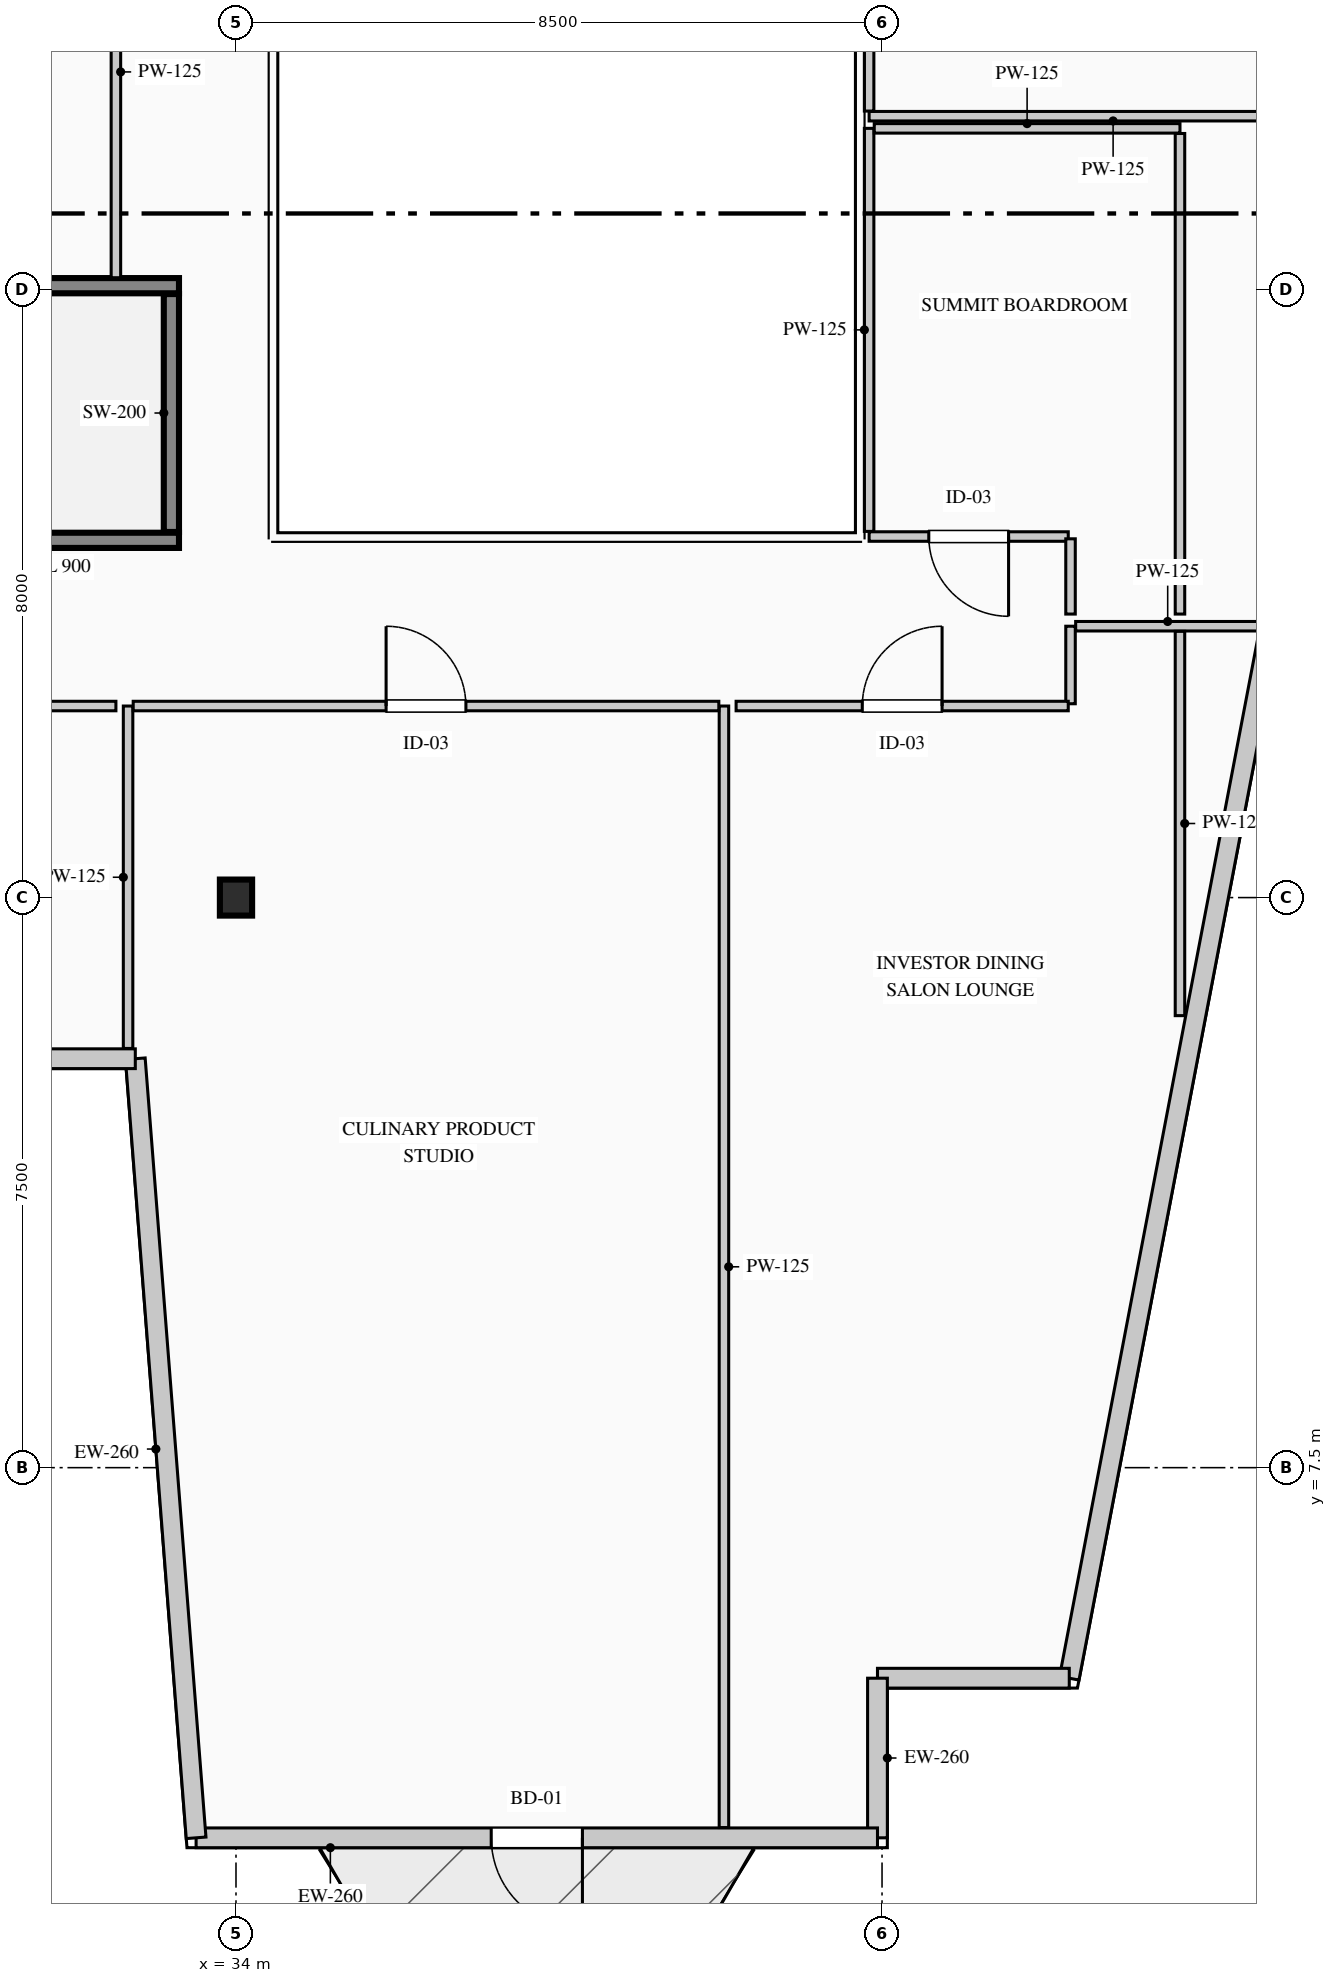
"""IFC4 building model, lengths in metres.
Left out: names, types, materials, properties, quantities, classifications, styles, units other than length and angle.
Written with IfcOpenShell. Run it as: python <this file> out.ifc"""

import sys

from ifc_helpers import new_model, si_unit, direction, frame, frame_2d, origin, origin_2d, place, context, subcontext, project, spatial, rectangle, i_section, extrude, element, fill, save


model = new_model("IFC4")
c1 = context("Model", 3, precision=1e-05, world=origin(), true_north=direction((0.0, 1.0)))
c2 = subcontext(c1, "Body", "Model", "MODEL_VIEW")
j1 = project(units=[si_unit("LENGTHUNIT", "METRE"), si_unit("PLANEANGLEUNIT", "RADIAN")], contexts=[c1])
p1 = place(None, origin())
s1 = spatial("IfcSite", under=j1, at=p1, CompositionType="ELEMENT")
p2 = place(p1, origin())
s2 = spatial("IfcBuilding", under=s1, at=p2, CompositionType="ELEMENT")
p3 = place(p2, frame((0.0, 0.0, 170.65)))
s3 = spatial("IfcBuildingStorey", under=s2, at=p3, CompositionType="ELEMENT", Elevation=170.65)
p4 = place(p3, frame((26.05, 19.7, 0.0), z_axis=(0.0, 0.0, 1.0), x_axis=(1.0, 0.0, 0.0)))
e1 = element("IfcWall", 1, at=p4, inside=s3, PredefinedType="SHEAR", context=c2, shape_type="SweptSolid", body=[
    extrude(rectangle(XDim=7.2, YDim=0.2, at=frame_2d((3.6, 0.0))), origin(), (0.0, 0.0, 1.0), 3.95),
])
p5 = place(p4, frame((0.38, 0.0, 0.0)))
e2 = element("IfcOpeningElement", 2, at=p5, cuts=e1, PredefinedType="OPENING", context=c2, shape_type="SweptSolid", body=[
    extrude(rectangle(XDim=1.15, YDim=2.2, at=frame_2d((0.575, 1.1))), frame((0.0, 0.11, 0.0), z_axis=(0.0, -1.0, 0.0), x_axis=(1.0, 0.0, 0.0)), (0.0, 0.0, 1.0), 0.22),
])
p6 = place(p3, frame((26.05, 23.05, 0.0), z_axis=(0.0, 0.0, 1.0), x_axis=(1.0, 0.0, 0.0)))
e3 = element("IfcWall", 3, at=p6, inside=s3, PredefinedType="SHEAR", context=c2, shape_type="SweptSolid", body=[
    extrude(rectangle(XDim=7.2, YDim=0.2, at=frame_2d((3.6, 0.0))), origin(), (0.0, 0.0, 1.0), 3.95),
])
p7 = place(p3, frame((33.15, 19.81, 0.0), z_axis=(0.0, 0.0, 1.0), x_axis=(0.0, 1.0, 0.0)))
e4 = element("IfcWall", 4, at=p7, inside=s3, PredefinedType="SHEAR", context=c2, shape_type="SweptSolid", body=[
    extrude(rectangle(XDim=3.13, YDim=0.2, at=frame_2d((1.565, 0.0))), origin(), (0.0, 0.0, 1.0), 3.95),
])
p8 = place(p3, frame((34.0, 15.0, 0.0), z_axis=(0.0, 0.0, 1.0), x_axis=(1.0, 0.0, 0.0)))
e5 = element("IfcColumn", 5, at=p8, inside=s3, PredefinedType="COLUMN", context=c2, shape_type="SweptSolid", body=[
    extrude(i_section(OverallWidth=0.424, OverallDepth=0.474, WebThickness=0.048, FlangeThickness=0.077, FilletRadius=0.015, at=origin_2d()), origin(), (0.0, 0.0, 1.0), 3.95),
])
p9 = place(p3, frame((51.942, 41.27, 0.0), z_axis=(0.0, 0.0, 1.0), x_axis=(-0.187592192405, -0.982247000173, 0.0)))
e6 = element("IfcWall", 6, at=p9, inside=s3, PredefinedType="STANDARD", context=c2, shape_type="SweptSolid", body=[
    extrude(rectangle(XDim=37.2, YDim=0.26, at=frame_2d((18.6, 0.0))), origin(), (0.0, 0.0, 1.0), 3.69),
])
p10 = place(p9, frame((12.342, 0.0, 0.9)))
e7 = element("IfcOpeningElement", 7, at=p10, cuts=e6, PredefinedType="OPENING", context=c2, shape_type="SweptSolid", body=[
    extrude(rectangle(XDim=2.1, YDim=2.0, at=frame_2d((1.05, 1.0))), frame((0.0, 0.14, 0.0), z_axis=(0.0, -1.0, 0.0), x_axis=(1.0, 0.0, 0.0)), (0.0, 0.0, 1.0), 0.28),
])
p11 = place(p3, frame((44.963, 4.73, 0.0), z_axis=(0.0, 0.0, 1.0), x_axis=(-1.0, 0.0, 0.0)))
e8 = element("IfcWall", 8, at=p11, inside=s3, PredefinedType="STANDARD", context=c2, shape_type="SweptSolid", body=[
    extrude(rectangle(XDim=2.523, YDim=0.26, at=frame_2d((1.262, 0.0))), origin(), (0.0, 0.0, 1.0), 3.69),
])
p12 = place(p3, frame((42.44, 4.73, 0.0), z_axis=(0.0, 0.0, 1.0), x_axis=(0.0, -1.0, 0.0)))
e9 = element("IfcWall", 9, at=p12, inside=s3, PredefinedType="STANDARD", context=c2, shape_type="SweptSolid", body=[
    extrude(rectangle(XDim=2.1, YDim=0.26, at=frame_2d((1.05, 0.0))), origin(), (0.0, 0.0, 1.0), 3.69),
])
p13 = place(p3, frame((42.44, 2.63, 0.0), z_axis=(0.0, 0.0, 1.0), x_axis=(-1.0, 0.0, 0.0)))
e10 = element("IfcWall", 10, at=p13, inside=s3, PredefinedType="STANDARD", context=c2, shape_type="SweptSolid", body=[
    extrude(rectangle(XDim=8.965, YDim=0.26, at=frame_2d((4.482, 0.0))), origin(), (0.0, 0.0, 1.0), 3.69),
])
p14 = place(p13, frame((3.882, 0.0, 0.0)))
e11 = element("IfcOpeningElement", 11, at=p14, cuts=e10, PredefinedType="OPENING", context=c2, shape_type="SweptSolid", body=[
    extrude(rectangle(XDim=1.2, YDim=2.2, at=frame_2d((0.6, 1.1))), frame((0.0, 0.14, 0.0), z_axis=(0.0, -1.0, 0.0), x_axis=(1.0, 0.0, 0.0)), (0.0, 0.0, 1.0), 0.28),
])
p15 = place(p3, frame((33.475, 2.63, 0.0), z_axis=(0.0, 0.0, 1.0), x_axis=(-0.077793257511, 0.996969512616, 0.0)))
e12 = element("IfcWall", 12, at=p15, inside=s3, PredefinedType="STANDARD", context=c2, shape_type="SweptSolid", body=[
    extrude(rectangle(XDim=10.281, YDim=0.26, at=frame_2d((5.141, 0.0))), origin(), (0.0, 0.0, 1.0), 3.69),
])
p16 = place(p3, frame((32.675, 12.88, 0.0), z_axis=(0.0, 0.0, 1.0), x_axis=(-1.0, 0.0, 0.0)))
e13 = element("IfcWall", 13, at=p16, inside=s3, PredefinedType="STANDARD", context=c2, shape_type="SweptSolid", body=[
    extrude(rectangle(XDim=7.765, YDim=0.26, at=frame_2d((3.883, 0.0))), origin(), (0.0, 0.0, 1.0), 3.69),
])
p17 = place(p16, frame((2.983, 0.0, 0.9)))
e14 = element("IfcOpeningElement", 14, at=p17, cuts=e13, PredefinedType="OPENING", context=c2, shape_type="SweptSolid", body=[
    extrude(rectangle(XDim=1.8, YDim=2.1, at=frame_2d((0.9, 1.05))), frame((0.0, 0.14, 0.0), z_axis=(0.0, -1.0, 0.0), x_axis=(1.0, 0.0, 0.0)), (0.0, 0.0, 1.0), 0.28),
])
p18 = place(p3, frame((40.42, 17.52, 0.0), z_axis=(0.0, 0.0, 1.0), x_axis=(0.0, -1.0, 0.0)))
e15 = element("IfcWall", 15, at=p18, inside=s3, PredefinedType="PARTITIONING", context=c2, shape_type="SweptSolid", body=[
    extrude(rectangle(XDim=14.755, YDim=0.125, at=frame_2d((7.377, 0.0))), origin(), (0.0, 0.0, 1.0), 3.69),
])
p19 = place(p3, frame((32.58, 13.015, 0.0), z_axis=(0.0, 0.0, 1.0), x_axis=(0.0, 1.0, 0.0)))
e16 = element("IfcWall", 16, at=p19, inside=s3, PredefinedType="PARTITIONING", context=c2, shape_type="SweptSolid", body=[
    extrude(rectangle(XDim=4.505, YDim=0.125, at=frame_2d((2.252, 0.0))), origin(), (0.0, 0.0, 1.0), 3.69),
])
p20 = place(p3, frame((32.647, 17.52, 0.0), z_axis=(0.0, 0.0, 1.0), x_axis=(1.0, 0.0, 0.0)))
e17 = element("IfcWall", 17, at=p20, inside=s3, PredefinedType="PARTITIONING", context=c2, shape_type="SweptSolid", body=[
    extrude(rectangle(XDim=7.705, YDim=0.125, at=frame_2d((3.853, 0.0))), origin(), (0.0, 0.0, 1.0), 3.275),
])
p21 = place(p20, frame((3.327, 0.0, 0.0)))
e18 = element("IfcOpeningElement", 18, at=p21, cuts=e17, PredefinedType="OPENING", context=c2, shape_type="SweptSolid", body=[
    extrude(rectangle(XDim=1.05, YDim=2.15, at=frame_2d((0.525, 1.075))), frame((0.0, 0.073, 0.0), z_axis=(0.0, -1.0, 0.0), x_axis=(1.0, 0.0, 0.0)), (0.0, 0.0, 1.0), 0.145),
])
p22 = place(p3, frame((44.98, 17.55, 0.0), z_axis=(0.0, 0.0, 1.0), x_axis=(0.0, 1.0, 0.0)))
e19 = element("IfcWall", 19, at=p22, inside=s3, PredefinedType="PARTITIONING", context=c2, shape_type="SweptSolid", body=[
    extrude(rectangle(XDim=1.02, YDim=0.125, at=frame_2d((0.51, 0.0))), origin(), (0.0, 0.0, 1.0), 3.69),
])
p23 = place(p3, frame((45.048, 18.57, 0.0), z_axis=(0.0, 0.0, 1.0), x_axis=(1.0, 0.0, 0.0)))
e20 = element("IfcWall", 20, at=p23, inside=s3, PredefinedType="PARTITIONING", context=c2, shape_type="SweptSolid", body=[
    extrude(rectangle(XDim=2.422, YDim=0.125, at=frame_2d((1.211, 0.0))), origin(), (0.0, 0.0, 1.0), 3.69),
])
p24 = place(p3, frame((46.42, 18.502, 0.0), z_axis=(0.0, 0.0, 1.0), x_axis=(0.0, -1.0, 0.0)))
e21 = element("IfcWall", 21, at=p24, inside=s3, PredefinedType="PARTITIONING", context=c2, shape_type="SweptSolid", body=[
    extrude(rectangle(XDim=5.056, YDim=0.125, at=frame_2d((2.528, 0.0))), origin(), (0.0, 0.0, 1.0), 3.69),
])
p25 = place(p3, frame((40.58, 17.52, 0.0), z_axis=(0.0, 0.0, 1.0), x_axis=(1.0, 0.0, 0.0)))
e22 = element("IfcWall", 22, at=p25, inside=s3, PredefinedType="PARTITIONING", context=c2, shape_type="SweptSolid", body=[
    extrude(rectangle(XDim=4.37, YDim=0.125, at=frame_2d((2.185, 0.0))), origin(), (0.0, 0.0, 1.0), 3.69),
])
p26 = place(p25, frame((1.66, 0.0, 0.0)))
e23 = element("IfcOpeningElement", 23, at=p26, cuts=e22, PredefinedType="OPENING", context=c2, shape_type="SweptSolid", body=[
    extrude(rectangle(XDim=1.05, YDim=2.15, at=frame_2d((0.525, 1.075))), frame((0.0, 0.073, 0.0), z_axis=(0.0, -1.0, 0.0), x_axis=(1.0, 0.0, 0.0)), (0.0, 0.0, 1.0), 0.145),
])
p27 = place(p3, frame((24.28, 17.52, 0.0), z_axis=(0.0, 0.0, 1.0), x_axis=(1.0, 0.0, 0.0)))
e24 = element("IfcWall", 24, at=p27, inside=s3, PredefinedType="PARTITIONING", context=c2, shape_type="SweptSolid", body=[
    extrude(rectangle(XDim=8.14, YDim=0.125, at=frame_2d((4.07, 0.0))), origin(), (0.0, 0.0, 1.0), 3.275),
])
p28 = place(p27, frame((3.545, 0.0, 0.0)))
e25 = element("IfcOpeningElement", 25, at=p28, cuts=e24, PredefinedType="OPENING", context=c2, shape_type="SweptSolid", body=[
    extrude(rectangle(XDim=1.05, YDim=2.15, at=frame_2d((0.525, 1.075))), frame((0.0, 0.073, 0.0), z_axis=(0.0, -1.0, 0.0), x_axis=(1.0, 0.0, 0.0)), (0.0, 0.0, 1.0), 0.145),
])
p29 = place(p3, frame((44.95, 19.75, 0.0), z_axis=(0.0, 0.0, 1.0), x_axis=(-1.0, 0.0, 0.0)))
e26 = element("IfcWall", 26, at=p29, inside=s3, PredefinedType="PARTITIONING", context=c2, shape_type="SweptSolid", body=[
    extrude(rectangle(XDim=2.62, YDim=0.125, at=frame_2d((1.31, 0.0))), origin(), (0.0, 0.0, 1.0), 3.69),
])
p30 = place(p29, frame((0.785, 0.0, 0.0)))
e27 = element("IfcOpeningElement", 27, at=p30, cuts=e26, PredefinedType="OPENING", context=c2, shape_type="SweptSolid", body=[
    extrude(rectangle(XDim=1.05, YDim=2.15, at=frame_2d((0.525, 1.075))), frame((0.0, 0.073, 0.0), z_axis=(0.0, -1.0, 0.0), x_axis=(1.0, 0.0, 0.0)), (0.0, 0.0, 1.0), 0.145),
])
p31 = place(p3, frame((42.33, 19.817, 0.0), z_axis=(0.0, 0.0, 1.0), x_axis=(0.0, 1.0, 0.0)))
e28 = element("IfcWall", 28, at=p31, inside=s3, PredefinedType="PARTITIONING", context=c2, shape_type="SweptSolid", body=[
    extrude(rectangle(XDim=5.303, YDim=0.125, at=frame_2d((2.651, 0.0))), origin(), (0.0, 0.0, 1.0), 3.69),
])
p32 = place(p3, frame((42.397, 25.12, 0.0), z_axis=(0.0, 0.0, 1.0), x_axis=(1.0, 0.0, 0.0)))
e29 = element("IfcWall", 29, at=p32, inside=s3, PredefinedType="PARTITIONING", context=c2, shape_type="SweptSolid", body=[
    extrude(rectangle(XDim=4.022, YDim=0.125, at=frame_2d((2.011, 0.0))), origin(), (0.0, 0.0, 1.0), 3.69),
])
p33 = place(p3, frame((46.42, 25.052, 0.0), z_axis=(0.0, 0.0, 1.0), x_axis=(0.0, -1.0, 0.0)))
e30 = element("IfcWall", 30, at=p33, inside=s3, PredefinedType="PARTITIONING", context=c2, shape_type="SweptSolid", body=[
    extrude(rectangle(XDim=6.323, YDim=0.125, at=frame_2d((3.161, 0.0))), origin(), (0.0, 0.0, 1.0), 3.69),
])
p34 = place(p3, frame((44.98, 18.73, 0.0), z_axis=(0.0, 0.0, 1.0), x_axis=(0.0, 1.0, 0.0)))
e31 = element("IfcWall", 31, at=p34, inside=s3, PredefinedType="PARTITIONING", context=c2, shape_type="SweptSolid", body=[
    extrude(rectangle(XDim=0.99, YDim=0.125, at=frame_2d((0.495, 0.0))), origin(), (0.0, 0.0, 1.0), 3.69),
])
p35 = place(p3, frame((32.42, 28.57, 0.0), z_axis=(0.0, 0.0, 1.0), x_axis=(0.0, -1.0, 0.0)))
e32 = element("IfcWall", 32, at=p35, inside=s3, PredefinedType="PARTITIONING", context=c2, shape_type="SweptSolid", body=[
    extrude(rectangle(XDim=5.415, YDim=0.125, at=frame_2d((2.708, 0.0))), origin(), (0.0, 0.0, 1.0), 3.69),
])
p36 = place(p3, frame((48.75, 25.28, 0.0), z_axis=(0.0, 0.0, 1.0), x_axis=(-1.0, 0.0, 0.0)))
e33 = element("IfcWall", 33, at=p36, inside=s3, PredefinedType="PARTITIONING", context=c2, shape_type="SweptSolid", body=[
    extrude(rectangle(XDim=6.42, YDim=0.125, at=frame_2d((3.21, 0.0))), origin(), (0.0, 0.0, 1.0), 3.69),
])
p37 = place(p3, frame((42.33, 25.347, 0.0), z_axis=(0.0, 0.0, 1.0), x_axis=(0.0, 1.0, 0.0)))
e34 = element("IfcWall", 34, at=p37, inside=s3, PredefinedType="PARTITIONING", context=c2, shape_type="SweptSolid", body=[
    extrude(rectangle(XDim=3.282, YDim=0.125, at=frame_2d((1.641, 0.0))), origin(), (0.0, 0.0, 1.0), 3.69),
])
p38 = place(p14, origin())
e35 = element("IfcDoor", 35, at=p38, inside=s3, OperationType="SINGLE_SWING_LEFT", PredefinedType="DOOR", context=c2, shape_type="SweptSolid", body=[
    extrude(rectangle(XDim=1.2, YDim=2.2, at=frame_2d((0.6, 1.1))), frame((0.0, 0.025, 0.0), z_axis=(0.0, -1.0, 0.0), x_axis=(1.0, 0.0, 0.0)), (0.0, 0.0, 1.0), 0.05),
])
fill(e11, e35)
p39 = place(p21, origin())
e36 = element("IfcDoor", 36, at=p39, inside=s3, OperationType="SINGLE_SWING_LEFT", PredefinedType="DOOR", context=c2, shape_type="SweptSolid", body=[
    extrude(rectangle(XDim=1.05, YDim=2.15, at=frame_2d((0.525, 1.075))), frame((0.0, 0.025, 0.0), z_axis=(0.0, -1.0, 0.0), x_axis=(1.0, 0.0, 0.0)), (0.0, 0.0, 1.0), 0.05),
])
fill(e18, e36)
p40 = place(p26, origin())
e37 = element("IfcDoor", 37, at=p40, inside=s3, OperationType="SINGLE_SWING_RIGHT", PredefinedType="DOOR", context=c2, shape_type="SweptSolid", body=[
    extrude(rectangle(XDim=1.05, YDim=2.15, at=frame_2d((0.525, 1.075))), frame((0.0, 0.025, 0.0), z_axis=(0.0, -1.0, 0.0), x_axis=(1.0, 0.0, 0.0)), (0.0, 0.0, 1.0), 0.05),
])
fill(e23, e37)
p41 = place(p30, origin())
e38 = element("IfcDoor", 38, at=p41, inside=s3, OperationType="SINGLE_SWING_LEFT", PredefinedType="DOOR", context=c2, shape_type="SweptSolid", body=[
    extrude(rectangle(XDim=1.05, YDim=2.15, at=frame_2d((0.525, 1.075))), frame((0.0, 0.025, 0.0), z_axis=(0.0, -1.0, 0.0), x_axis=(1.0, 0.0, 0.0)), (0.0, 0.0, 1.0), 0.05),
])
fill(e27, e38)
save(model, sys.argv[1])
